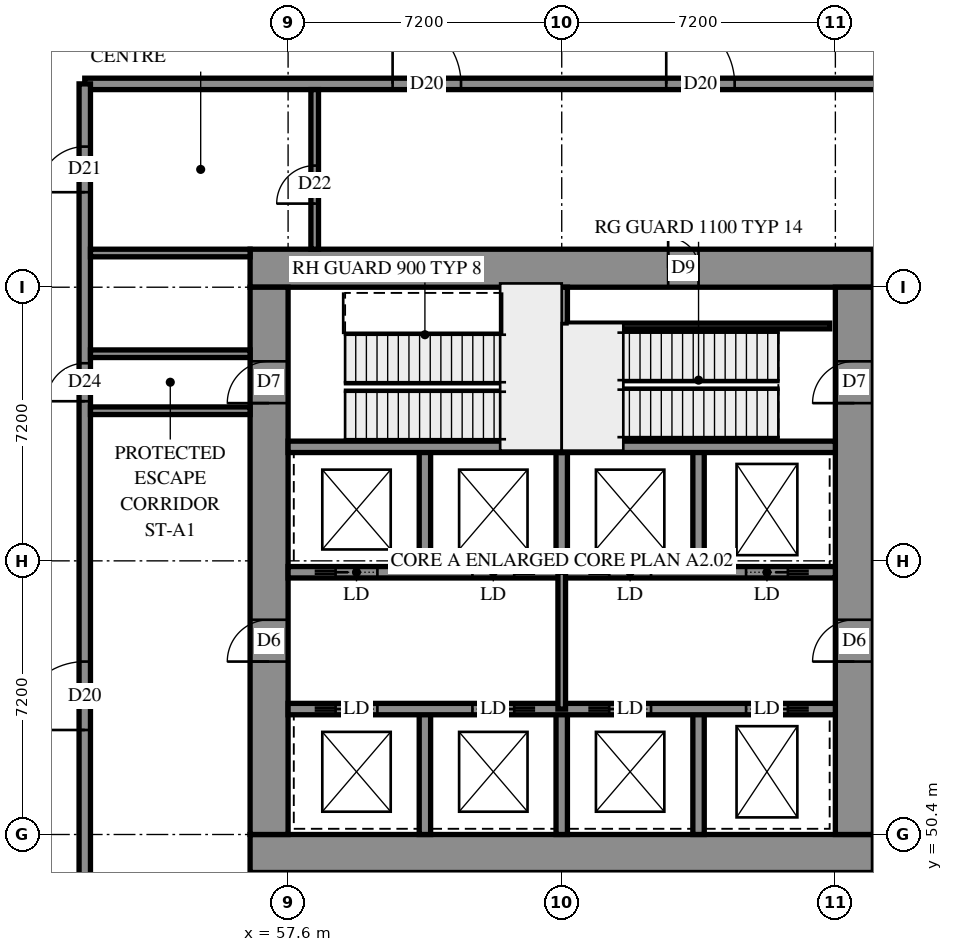
"""IFC4 building model, lengths in metres.
Left out: names, types, materials, properties, quantities, classifications, styles, units other than length and angle.
Written with IfcOpenShell. Run it as: python <this file> out.ifc"""

import sys

from ifc_helpers import new_model, si_unit, direction, frame, frame_2d, origin, place, context, subcontext, project, spatial, rectangle, extrude, element, fill, save


model = new_model("IFC4")
c1 = context("Model", 3, precision=1e-05, world=origin(), true_north=direction((0.0, 1.0)))
c2 = subcontext(c1, "Body", "Model", "MODEL_VIEW")
j1 = project(units=[si_unit("LENGTHUNIT", "METRE"), si_unit("PLANEANGLEUNIT", "RADIAN")], contexts=[c1])
p1 = place(None, origin())
s1 = spatial("IfcSite", under=j1, at=p1, CompositionType="ELEMENT")
p2 = place(p1, origin())
s2 = spatial("IfcBuilding", under=s1, at=p2, CompositionType="ELEMENT")
p3 = place(p2, origin())
s3 = spatial("IfcBuildingStorey", under=s2, at=p3, CompositionType="ELEMENT", Elevation=0.0)
p4 = place(p3, frame((56.6, 49.9, -0.4), z_axis=(0.0, 0.0, 1.0), x_axis=(1.0, 0.0, 0.0)))
e1 = element("IfcWall", 1, at=p4, inside=s3, PredefinedType="SHEAR", context=c2, shape_type="SweptSolid", body=[
    extrude(rectangle(XDim=16.4, YDim=1.0, at=frame_2d((8.2, 0.0))), origin(), (0.0, 0.0, 1.0), 5.3),
])
p5 = place(p3, frame((56.6, 65.3, -0.4), z_axis=(0.0, 0.0, 1.0), x_axis=(1.0, 0.0, 0.0)))
e2 = element("IfcWall", 2, at=p5, inside=s3, PredefinedType="SHEAR", context=c2, shape_type="SweptSolid", body=[
    extrude(rectangle(XDim=16.4, YDim=1.0, at=frame_2d((8.2, 0.0))), origin(), (0.0, 0.0, 1.0), 5.3),
])
p6 = place(p5, frame((11.0, 0.0, 0.4)))
e3 = element("IfcOpeningElement", 3, at=p6, cuts=e2, PredefinedType="OPENING", context=c2, shape_type="SweptSolid", body=[
    extrude(rectangle(XDim=0.8, YDim=2.1, at=frame_2d((0.4, 1.05))), frame((0.0, 0.51, 0.0), z_axis=(0.0, -1.0, 0.0), x_axis=(1.0, 0.0, 0.0)), (0.0, 0.0, 1.0), 1.02),
])
p7 = place(p3, frame((57.1, 50.4, -0.4), z_axis=(0.0, 0.0, 1.0), x_axis=(0.0, 1.0, 0.0)))
e4 = element("IfcWall", 4, at=p7, inside=s3, PredefinedType="SHEAR", context=c2, shape_type="SweptSolid", body=[
    extrude(rectangle(XDim=14.4, YDim=1.0, at=frame_2d((7.2, 0.0))), origin(), (0.0, 0.0, 1.0), 5.3),
])
p8 = place(p7, frame((4.55, 0.0, 0.4)))
e5 = element("IfcOpeningElement", 5, at=p8, cuts=e4, PredefinedType="OPENING", context=c2, shape_type="SweptSolid", body=[
    extrude(rectangle(XDim=1.1, YDim=2.1, at=frame_2d((0.55, 1.05))), frame((0.0, 0.51, 0.0), z_axis=(0.0, -1.0, 0.0), x_axis=(1.0, 0.0, 0.0)), (0.0, 0.0, 1.0), 1.02),
])
p9 = place(p7, frame((11.35, 0.0, 0.4)))
e6 = element("IfcOpeningElement", 6, at=p9, cuts=e4, PredefinedType="OPENING", context=c2, shape_type="SweptSolid", body=[
    extrude(rectangle(XDim=1.1, YDim=2.1, at=frame_2d((0.55, 1.05))), frame((0.0, 0.51, 0.0), z_axis=(0.0, -1.0, 0.0), x_axis=(1.0, 0.0, 0.0)), (0.0, 0.0, 1.0), 1.02),
])
p10 = place(p3, frame((72.5, 50.4, -0.4), z_axis=(0.0, 0.0, 1.0), x_axis=(0.0, 1.0, 0.0)))
e7 = element("IfcWall", 7, at=p10, inside=s3, PredefinedType="SHEAR", context=c2, shape_type="SweptSolid", body=[
    extrude(rectangle(XDim=14.4, YDim=1.0, at=frame_2d((7.2, 0.0))), origin(), (0.0, 0.0, 1.0), 5.3),
])
p11 = place(p10, frame((4.55, 0.0, 0.4)))
e8 = element("IfcOpeningElement", 8, at=p11, cuts=e7, PredefinedType="OPENING", context=c2, shape_type="SweptSolid", body=[
    extrude(rectangle(XDim=1.1, YDim=2.1, at=frame_2d((0.55, 1.05))), frame((0.0, 0.51, 0.0), z_axis=(0.0, -1.0, 0.0), x_axis=(1.0, 0.0, 0.0)), (0.0, 0.0, 1.0), 1.02),
])
p12 = place(p10, frame((11.35, 0.0, 0.4)))
e9 = element("IfcOpeningElement", 9, at=p12, cuts=e7, PredefinedType="OPENING", context=c2, shape_type="SweptSolid", body=[
    extrude(rectangle(XDim=1.1, YDim=2.1, at=frame_2d((0.55, 1.05))), frame((0.0, 0.51, 0.0), z_axis=(0.0, -1.0, 0.0), x_axis=(1.0, 0.0, 0.0)), (0.0, 0.0, 1.0), 1.02),
])
for number, where, z_axis, x_axis in (
    (10, (61.2, 50.4, 0.0), (0.0, 0.0, 1.0), (0.0, 1.0, 0.0)),
    (11, (61.2, 57.3, 0.0), (0.0, 0.0, 1.0), (0.0, 1.0, 0.0)),
    (12, (64.8, 50.4, 0.0), (0.0, 0.0, 1.0), (0.0, 1.0, 0.0)),
    (13, (64.8, 57.3, 0.0), (0.0, 0.0, 1.0), (0.0, 1.0, 0.0)),
    (14, (68.4, 50.4, 0.0), (0.0, 0.0, 1.0), (0.0, 1.0, 0.0)),
    (15, (68.4, 57.3, 0.0), (0.0, 0.0, 1.0), (0.0, 1.0, 0.0)),
):
    element("IfcWall", number, at=place(p3, frame(where, z_axis=z_axis, x_axis=x_axis)), inside=s3, PredefinedType="SOLIDWALL", context=c2, shape_type="SweptSolid", body=[
        extrude(rectangle(XDim=3.3, YDim=0.3, at=frame_2d((1.65, 0.0))), origin(), (0.0, 0.0, 1.0), 5.6),
    ])
p13 = place(p3, frame((57.6, 53.7, 0.0), z_axis=(0.0, 0.0, 1.0), x_axis=(1.0, 0.0, 0.0)))
e16 = element("IfcWall", 16, at=p13, inside=s3, PredefinedType="SOLIDWALL", context=c2, shape_type="SweptSolid", body=[
    extrude(rectangle(XDim=14.4, YDim=0.3, at=frame_2d((7.2, 0.0))), origin(), (0.0, 0.0, 1.0), 5.6),
])
p14 = place(p13, frame((1.25, 0.0, 0.0)))
e17 = element("IfcOpeningElement", 17, at=p14, cuts=e16, PredefinedType="OPENING", context=c2, shape_type="SweptSolid", body=[
    extrude(rectangle(XDim=1.1, YDim=2.1, at=frame_2d((0.55, 1.05))), frame((0.0, 0.16, 0.0), z_axis=(0.0, -1.0, 0.0), x_axis=(1.0, 0.0, 0.0)), (0.0, 0.0, 1.0), 0.32),
])
p15 = place(p13, frame((4.85, 0.0, 0.0)))
e18 = element("IfcOpeningElement", 18, at=p15, cuts=e16, PredefinedType="OPENING", context=c2, shape_type="SweptSolid", body=[
    extrude(rectangle(XDim=1.1, YDim=2.1, at=frame_2d((0.55, 1.05))), frame((0.0, 0.16, 0.0), z_axis=(0.0, -1.0, 0.0), x_axis=(1.0, 0.0, 0.0)), (0.0, 0.0, 1.0), 0.32),
])
p16 = place(p13, frame((8.45, 0.0, 0.0)))
e19 = element("IfcOpeningElement", 19, at=p16, cuts=e16, PredefinedType="OPENING", context=c2, shape_type="SweptSolid", body=[
    extrude(rectangle(XDim=1.1, YDim=2.1, at=frame_2d((0.55, 1.05))), frame((0.0, 0.16, 0.0), z_axis=(0.0, -1.0, 0.0), x_axis=(1.0, 0.0, 0.0)), (0.0, 0.0, 1.0), 0.32),
])
p17 = place(p13, frame((12.05, 0.0, 0.0)))
e20 = element("IfcOpeningElement", 20, at=p17, cuts=e16, PredefinedType="OPENING", context=c2, shape_type="SweptSolid", body=[
    extrude(rectangle(XDim=1.1, YDim=2.1, at=frame_2d((0.55, 1.05))), frame((0.0, 0.16, 0.0), z_axis=(0.0, -1.0, 0.0), x_axis=(1.0, 0.0, 0.0)), (0.0, 0.0, 1.0), 0.32),
])
p18 = place(p3, frame((57.6, 57.3, 0.0), z_axis=(0.0, 0.0, 1.0), x_axis=(1.0, 0.0, 0.0)))
e21 = element("IfcWall", 21, at=p18, inside=s3, PredefinedType="SOLIDWALL", context=c2, shape_type="SweptSolid", body=[
    extrude(rectangle(XDim=14.4, YDim=0.3, at=frame_2d((7.2, 0.0))), origin(), (0.0, 0.0, 1.0), 5.6),
])
p19 = place(p18, frame((1.25, 0.0, 0.0)))
e22 = element("IfcOpeningElement", 22, at=p19, cuts=e21, PredefinedType="OPENING", context=c2, shape_type="SweptSolid", body=[
    extrude(rectangle(XDim=1.1, YDim=2.1, at=frame_2d((0.55, 1.05))), frame((0.0, 0.16, 0.0), z_axis=(0.0, -1.0, 0.0), x_axis=(1.0, 0.0, 0.0)), (0.0, 0.0, 1.0), 0.32),
])
p20 = place(p18, frame((4.85, 0.0, 0.0)))
e23 = element("IfcOpeningElement", 23, at=p20, cuts=e21, PredefinedType="OPENING", context=c2, shape_type="SweptSolid", body=[
    extrude(rectangle(XDim=1.1, YDim=2.1, at=frame_2d((0.55, 1.05))), frame((0.0, 0.16, 0.0), z_axis=(0.0, -1.0, 0.0), x_axis=(1.0, 0.0, 0.0)), (0.0, 0.0, 1.0), 0.32),
])
p21 = place(p18, frame((8.45, 0.0, 0.0)))
e24 = element("IfcOpeningElement", 24, at=p21, cuts=e21, PredefinedType="OPENING", context=c2, shape_type="SweptSolid", body=[
    extrude(rectangle(XDim=1.1, YDim=2.1, at=frame_2d((0.55, 1.05))), frame((0.0, 0.16, 0.0), z_axis=(0.0, -1.0, 0.0), x_axis=(1.0, 0.0, 0.0)), (0.0, 0.0, 1.0), 0.32),
])
p22 = place(p18, frame((12.05, 0.0, 0.0)))
e25 = element("IfcOpeningElement", 25, at=p22, cuts=e21, PredefinedType="OPENING", context=c2, shape_type="SweptSolid", body=[
    extrude(rectangle(XDim=1.1, YDim=2.1, at=frame_2d((0.55, 1.05))), frame((0.0, 0.16, 0.0), z_axis=(0.0, -1.0, 0.0), x_axis=(1.0, 0.0, 0.0)), (0.0, 0.0, 1.0), 0.32),
])
for number, where, z_axis, x_axis in (
    (26, (57.6, 60.6, 0.0), (0.0, 0.0, 1.0), (1.0, 0.0, 0.0)),
    (27, (64.8, 60.6, 0.0), (0.0, 0.0, 1.0), (1.0, 0.0, 0.0)),
):
    element("IfcWall", number, at=place(p3, frame(where, z_axis=z_axis, x_axis=x_axis)), inside=s3, PredefinedType="SOLIDWALL", context=c2, shape_type="SweptSolid", body=[
        extrude(rectangle(XDim=7.2, YDim=0.3, at=frame_2d((3.6, 0.0))), origin(), (0.0, 0.0, 1.0), 5.6),
    ])
p23 = place(p3, frame((64.8, 60.6, 0.0), z_axis=(0.0, 0.0, 1.0), x_axis=(0.0, 1.0, 0.0)))
e28 = element("IfcWall", 28, at=p23, inside=s3, PredefinedType="SOLIDWALL", context=c2, shape_type="SweptSolid", body=[
    extrude(rectangle(XDim=4.2, YDim=0.3, at=frame_2d((2.1, 0.0))), origin(), (0.0, 0.0, 1.0), 5.6),
])
p24 = place(p3, frame((64.95, 63.78, 0.0), z_axis=(0.0, 0.0, 1.0), x_axis=(1.0, 0.0, 0.0)))
e29 = element("IfcWall", 29, at=p24, inside=s3, PredefinedType="PARTITIONING", context=c2, shape_type="SweptSolid", body=[
    extrude(rectangle(XDim=6.9, YDim=0.15, at=frame_2d((3.45, 0.0))), origin(), (0.0, 0.0, 1.0), 5.6),
])
p25 = place(p3, frame((64.8, 53.7, 0.0), z_axis=(0.0, 0.0, 1.0), x_axis=(0.0, 1.0, 0.0)))
e30 = element("IfcWall", 30, at=p25, inside=s3, PredefinedType="PARTITIONING", context=c2, shape_type="SweptSolid", body=[
    extrude(rectangle(XDim=3.6, YDim=0.2, at=frame_2d((1.8, 0.0))), origin(), (0.0, 0.0, 1.0), 5.6),
])
p26 = place(p3, frame((52.25, 70.15, 0.0), z_axis=(0.0, 0.0, 1.0), x_axis=(1.0, 0.0, 0.0)))
e31 = element("IfcWall", 31, at=p26, inside=s3, PredefinedType="PARTITIONING", context=c2, shape_type="SweptSolid", body=[
    extrude(rectangle(XDim=25.1, YDim=0.3, at=frame_2d((12.55, 0.0))), origin(), (0.0, 0.0, 1.0), 5.6),
])
p27 = place(p26, frame((15.3, 0.0, 0.0)))
e32 = element("IfcOpeningElement", 32, at=p27, cuts=e31, PredefinedType="OPENING", context=c2, shape_type="SweptSolid", body=[
    extrude(rectangle(XDim=1.8, YDim=2.4, at=frame_2d((0.9, 1.2))), frame((0.0, 0.16, 0.0), z_axis=(0.0, -1.0, 0.0), x_axis=(1.0, 0.0, 0.0)), (0.0, 0.0, 1.0), 0.32),
])
p28 = place(p26, frame((8.1, 0.0, 0.0)))
e33 = element("IfcOpeningElement", 33, at=p28, cuts=e31, PredefinedType="OPENING", context=c2, shape_type="SweptSolid", body=[
    extrude(rectangle(XDim=1.8, YDim=2.4, at=frame_2d((0.9, 1.2))), frame((0.0, 0.16, 0.0), z_axis=(0.0, -1.0, 0.0), x_axis=(1.0, 0.0, 0.0)), (0.0, 0.0, 1.0), 0.32),
])
p29 = place(p3, frame((52.25, 45.05, 0.0), z_axis=(0.0, 0.0, 1.0), x_axis=(0.0, 1.0, 0.0)))
e34 = element("IfcWall", 34, at=p29, inside=s3, PredefinedType="PARTITIONING", context=c2, shape_type="SweptSolid", body=[
    extrude(rectangle(XDim=25.1, YDim=0.3, at=frame_2d((12.55, 0.0))), origin(), (0.0, 0.0, 1.0), 5.6),
])
p30 = place(p29, frame((8.1, 0.0, 0.0)))
e35 = element("IfcOpeningElement", 35, at=p30, cuts=e34, PredefinedType="OPENING", context=c2, shape_type="SweptSolid", body=[
    extrude(rectangle(XDim=1.8, YDim=2.4, at=frame_2d((0.9, 1.2))), frame((0.0, 0.16, 0.0), z_axis=(0.0, -1.0, 0.0), x_axis=(1.0, 0.0, 0.0)), (0.0, 0.0, 1.0), 0.32),
])
p31 = place(p29, frame((1.5, 0.0, 0.0)))
e36 = element("IfcOpeningElement", 36, at=p31, cuts=e34, PredefinedType="OPENING", context=c2, shape_type="SweptSolid", body=[
    extrude(rectangle(XDim=1.8, YDim=2.4, at=frame_2d((0.9, 1.2))), frame((0.0, 0.16, 0.0), z_axis=(0.0, -1.0, 0.0), x_axis=(1.0, 0.0, 0.0)), (0.0, 0.0, 1.0), 0.32),
])
p32 = place(p29, frame((16.75, 0.0, 0.0)))
e37 = element("IfcOpeningElement", 37, at=p32, cuts=e34, PredefinedType="OPENING", context=c2, shape_type="SweptSolid", body=[
    extrude(rectangle(XDim=1.0, YDim=2.1, at=frame_2d((0.5, 1.05))), frame((0.0, 0.16, 0.0), z_axis=(0.0, -1.0, 0.0), x_axis=(1.0, 0.0, 0.0)), (0.0, 0.0, 1.0), 0.32),
])
p33 = place(p29, frame((22.25, 0.0, 0.0)))
e38 = element("IfcOpeningElement", 38, at=p33, cuts=e34, PredefinedType="OPENING", context=c2, shape_type="SweptSolid", body=[
    extrude(rectangle(XDim=1.2, YDim=2.1, at=frame_2d((0.6, 1.05))), frame((0.0, 0.16, 0.0), z_axis=(0.0, -1.0, 0.0), x_axis=(1.0, 0.0, 0.0)), (0.0, 0.0, 1.0), 0.32),
])
for number, where, z_axis, x_axis in (
    (39, (56.6, 61.55, 0.0), (0.0, 0.0, 1.0), (-1.0, 0.0, 0.0)),
    (40, (56.6, 63.05, 0.0), (0.0, 0.0, 1.0), (-1.0, 0.0, 0.0)),
):
    element("IfcWall", number, at=place(p3, frame(where, z_axis=z_axis, x_axis=x_axis)), inside=s3, PredefinedType="PARTITIONING", context=c2, shape_type="SweptSolid", body=[
        extrude(rectangle(XDim=4.2, YDim=0.2, at=frame_2d((2.1, 0.0))), origin(), (0.0, 0.0, 1.0), 5.6),
    ])
p34 = place(p3, frame((58.3, 65.8, 0.0), z_axis=(0.0, 0.0, 1.0), x_axis=(0.0, 1.0, 0.0)))
e41 = element("IfcWall", 41, at=p34, inside=s3, PredefinedType="PARTITIONING", context=c2, shape_type="SweptSolid", body=[
    extrude(rectangle(XDim=4.2, YDim=0.2, at=frame_2d((2.1, 0.0))), origin(), (0.0, 0.0, 1.0), 5.6),
])
p35 = place(p34, frame((1.2, 0.0, 0.0)))
e42 = element("IfcOpeningElement", 42, at=p35, cuts=e41, PredefinedType="OPENING", context=c2, shape_type="SweptSolid", body=[
    extrude(rectangle(XDim=1.0, YDim=2.1, at=frame_2d((0.5, 1.05))), frame((0.0, 0.11, 0.0), z_axis=(0.0, -1.0, 0.0), x_axis=(1.0, 0.0, 0.0)), (0.0, 0.0, 1.0), 0.22),
])
p36 = place(p3, frame((52.4, 65.7, 0.0), z_axis=(0.0, 0.0, 1.0), x_axis=(1.0, 0.0, 0.0)))
e43 = element("IfcWall", 43, at=p36, inside=s3, PredefinedType="PARTITIONING", context=c2, shape_type="SweptSolid", body=[
    extrude(rectangle(XDim=4.2, YDim=0.2, at=frame_2d((2.1, 0.0))), origin(), (0.0, 0.0, 1.0), 5.6),
])
p37 = place(p6, origin())
e44 = element("IfcDoor", 44, at=p37, inside=s3, OperationType="SINGLE_SWING_RIGHT", PredefinedType="DOOR", context=c2, shape_type="SweptSolid", body=[
    extrude(rectangle(XDim=0.8, YDim=2.1, at=frame_2d((0.4, 1.05))), frame((0.0, -0.44, 0.0), z_axis=(0.0, -1.0, 0.0), x_axis=(1.0, 0.0, 0.0)), (0.0, 0.0, 1.0), 0.05),
])
fill(e3, e44)
p38 = place(p8, origin())
e45 = element("IfcDoor", 45, at=p38, inside=s3, OperationType="DOUBLE_DOOR_SINGLE_SWING", PredefinedType="DOOR", context=c2, shape_type="SweptSolid", body=[
    extrude(rectangle(XDim=1.1, YDim=2.1, at=frame_2d((0.55, 1.05))), frame((0.0, 0.025, 0.0), z_axis=(0.0, -1.0, 0.0), x_axis=(1.0, 0.0, 0.0)), (0.0, 0.0, 1.0), 0.05),
])
fill(e5, e45)
p39 = place(p11, origin())
e46 = element("IfcDoor", 46, at=p39, inside=s3, OperationType="DOUBLE_DOOR_SINGLE_SWING", PredefinedType="DOOR", context=c2, shape_type="SweptSolid", body=[
    extrude(rectangle(XDim=1.1, YDim=2.1, at=frame_2d((0.55, 1.05))), frame((0.0, 0.025, 0.0), z_axis=(0.0, -1.0, 0.0), x_axis=(1.0, 0.0, 0.0)), (0.0, 0.0, 1.0), 0.05),
])
fill(e8, e46)
p40 = place(p9, origin())
e47 = element("IfcDoor", 47, at=p40, inside=s3, OperationType="SINGLE_SWING_LEFT", PredefinedType="DOOR", context=c2, shape_type="SweptSolid", body=[
    extrude(rectangle(XDim=1.1, YDim=2.1, at=frame_2d((0.55, 1.05))), frame((0.0, 0.025, 0.0), z_axis=(0.0, -1.0, 0.0), x_axis=(1.0, 0.0, 0.0)), (0.0, 0.0, 1.0), 0.05),
])
fill(e6, e47)
p41 = place(p12, origin())
e48 = element("IfcDoor", 48, at=p41, inside=s3, OperationType="SINGLE_SWING_RIGHT", PredefinedType="DOOR", context=c2, shape_type="SweptSolid", body=[
    extrude(rectangle(XDim=1.1, YDim=2.1, at=frame_2d((0.55, 1.05))), frame((0.0, 0.025, 0.0), z_axis=(0.0, -1.0, 0.0), x_axis=(1.0, 0.0, 0.0)), (0.0, 0.0, 1.0), 0.05),
])
fill(e9, e48)
p42 = place(p14, origin())
e49 = element("IfcDoor", 49, at=p42, inside=s3, OperationType="SLIDING_TO_LEFT", PredefinedType="DOOR", context=c2, shape_type="SweptSolid", body=[
    extrude(rectangle(XDim=1.1, YDim=2.1, at=frame_2d((0.55, 1.05))), frame((0.0, 0.025, 0.0), z_axis=(0.0, -1.0, 0.0), x_axis=(1.0, 0.0, 0.0)), (0.0, 0.0, 1.0), 0.05),
])
fill(e17, e49)
p43 = place(p15, origin())
e50 = element("IfcDoor", 50, at=p43, inside=s3, OperationType="SLIDING_TO_RIGHT", PredefinedType="DOOR", context=c2, shape_type="SweptSolid", body=[
    extrude(rectangle(XDim=1.1, YDim=2.1, at=frame_2d((0.55, 1.05))), frame((0.0, 0.025, 0.0), z_axis=(0.0, -1.0, 0.0), x_axis=(1.0, 0.0, 0.0)), (0.0, 0.0, 1.0), 0.05),
])
fill(e18, e50)
p44 = place(p16, origin())
e51 = element("IfcDoor", 51, at=p44, inside=s3, OperationType="SLIDING_TO_LEFT", PredefinedType="DOOR", context=c2, shape_type="SweptSolid", body=[
    extrude(rectangle(XDim=1.1, YDim=2.1, at=frame_2d((0.55, 1.05))), frame((0.0, 0.025, 0.0), z_axis=(0.0, -1.0, 0.0), x_axis=(1.0, 0.0, 0.0)), (0.0, 0.0, 1.0), 0.05),
])
fill(e19, e51)
p45 = place(p17, origin())
e52 = element("IfcDoor", 52, at=p45, inside=s3, OperationType="SLIDING_TO_RIGHT", PredefinedType="DOOR", context=c2, shape_type="SweptSolid", body=[
    extrude(rectangle(XDim=1.1, YDim=2.1, at=frame_2d((0.55, 1.05))), frame((0.0, 0.025, 0.0), z_axis=(0.0, -1.0, 0.0), x_axis=(1.0, 0.0, 0.0)), (0.0, 0.0, 1.0), 0.05),
])
fill(e20, e52)
p46 = place(p19, origin())
e53 = element("IfcDoor", 53, at=p46, inside=s3, OperationType="SLIDING_TO_LEFT", PredefinedType="DOOR", context=c2, shape_type="SweptSolid", body=[
    extrude(rectangle(XDim=1.1, YDim=2.1, at=frame_2d((0.55, 1.05))), frame((0.0, 0.025, 0.0), z_axis=(0.0, -1.0, 0.0), x_axis=(1.0, 0.0, 0.0)), (0.0, 0.0, 1.0), 0.05),
])
fill(e22, e53)
p47 = place(p20, origin())
e54 = element("IfcDoor", 54, at=p47, inside=s3, OperationType="SLIDING_TO_RIGHT", PredefinedType="DOOR", context=c2, shape_type="SweptSolid", body=[
    extrude(rectangle(XDim=1.1, YDim=2.1, at=frame_2d((0.55, 1.05))), frame((0.0, 0.025, 0.0), z_axis=(0.0, -1.0, 0.0), x_axis=(1.0, 0.0, 0.0)), (0.0, 0.0, 1.0), 0.05),
])
fill(e23, e54)
p48 = place(p21, origin())
e55 = element("IfcDoor", 55, at=p48, inside=s3, OperationType="SLIDING_TO_LEFT", PredefinedType="DOOR", context=c2, shape_type="SweptSolid", body=[
    extrude(rectangle(XDim=1.1, YDim=2.1, at=frame_2d((0.55, 1.05))), frame((0.0, 0.025, 0.0), z_axis=(0.0, -1.0, 0.0), x_axis=(1.0, 0.0, 0.0)), (0.0, 0.0, 1.0), 0.05),
])
fill(e24, e55)
p49 = place(p22, origin())
e56 = element("IfcDoor", 56, at=p49, inside=s3, OperationType="SLIDING_TO_RIGHT", PredefinedType="DOOR", context=c2, shape_type="SweptSolid", body=[
    extrude(rectangle(XDim=1.1, YDim=2.1, at=frame_2d((0.55, 1.05))), frame((0.0, 0.025, 0.0), z_axis=(0.0, -1.0, 0.0), x_axis=(1.0, 0.0, 0.0)), (0.0, 0.0, 1.0), 0.05),
])
fill(e25, e56)
p50 = place(p27, origin())
e57 = element("IfcDoor", 57, at=p50, inside=s3, OperationType="DOUBLE_DOOR_SINGLE_SWING", PredefinedType="DOOR", context=c2, shape_type="SweptSolid", body=[
    extrude(rectangle(XDim=1.8, YDim=2.4, at=frame_2d((0.9, 1.2))), frame((0.0, 0.025, 0.0), z_axis=(0.0, -1.0, 0.0), x_axis=(1.0, 0.0, 0.0)), (0.0, 0.0, 1.0), 0.05),
])
fill(e32, e57)
p51 = place(p28, origin())
e58 = element("IfcDoor", 58, at=p51, inside=s3, OperationType="DOUBLE_DOOR_SINGLE_SWING", PredefinedType="DOOR", context=c2, shape_type="SweptSolid", body=[
    extrude(rectangle(XDim=1.8, YDim=2.4, at=frame_2d((0.9, 1.2))), frame((0.0, 0.025, 0.0), z_axis=(0.0, -1.0, 0.0), x_axis=(1.0, 0.0, 0.0)), (0.0, 0.0, 1.0), 0.05),
])
fill(e33, e58)
p52 = place(p30, origin())
e59 = element("IfcDoor", 59, at=p52, inside=s3, OperationType="DOUBLE_DOOR_SINGLE_SWING", PredefinedType="DOOR", context=c2, shape_type="SweptSolid", body=[
    extrude(rectangle(XDim=1.8, YDim=2.4, at=frame_2d((0.9, 1.2))), frame((0.0, 0.025, 0.0), z_axis=(0.0, -1.0, 0.0), x_axis=(1.0, 0.0, 0.0)), (0.0, 0.0, 1.0), 0.05),
])
fill(e35, e59)
p53 = place(p32, origin())
e60 = element("IfcDoor", 60, at=p53, inside=s3, OperationType="SINGLE_SWING_RIGHT", PredefinedType="DOOR", context=c2, shape_type="SweptSolid", body=[
    extrude(rectangle(XDim=1.0, YDim=2.1, at=frame_2d((0.5, 1.05))), frame((0.0, 0.025, 0.0), z_axis=(0.0, -1.0, 0.0), x_axis=(1.0, 0.0, 0.0)), (0.0, 0.0, 1.0), 0.05),
])
fill(e37, e60)
p54 = place(p35, origin())
e61 = element("IfcDoor", 61, at=p54, inside=s3, OperationType="SINGLE_SWING_LEFT", PredefinedType="DOOR", context=c2, shape_type="SweptSolid", body=[
    extrude(rectangle(XDim=1.0, YDim=2.1, at=frame_2d((0.5, 1.05))), frame((0.0, 0.025, 0.0), z_axis=(0.0, -1.0, 0.0), x_axis=(1.0, 0.0, 0.0)), (0.0, 0.0, 1.0), 0.05),
])
fill(e42, e61)
p55 = place(p33, origin())
e62 = element("IfcDoor", 62, at=p55, inside=s3, OperationType="SINGLE_SWING_RIGHT", PredefinedType="DOOR", context=c2, shape_type="SweptSolid", body=[
    extrude(rectangle(XDim=1.2, YDim=2.1, at=frame_2d((0.6, 1.05))), frame((0.0, 0.025, 0.0), z_axis=(0.0, -1.0, 0.0), x_axis=(1.0, 0.0, 0.0)), (0.0, 0.0, 1.0), 0.05),
])
fill(e38, e62)
save(model, sys.argv[1])
